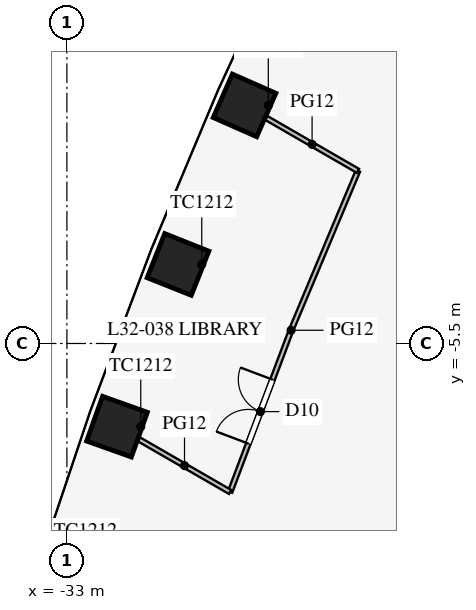
"""IFC4 building model, lengths in metres.
Left out: names, types, materials, properties, quantities, classifications, styles, units other than length and angle.
Written with IfcOpenShell. Run it as: python <this file> out.ifc"""

import sys

from ifc_helpers import new_model, si_unit, direction, frame, frame_2d, origin, origin_2d, place, context, subcontext, project, spatial, rectangle, extrude, element, fill, save


model = new_model("IFC4")
c1 = context("Model", 3, precision=1e-05, world=origin(), true_north=direction((0.0, 1.0)))
c2 = subcontext(c1, "Body", "Model", "MODEL_VIEW")
j1 = project(units=[si_unit("LENGTHUNIT", "METRE"), si_unit("PLANEANGLEUNIT", "RADIAN")], contexts=[c1])
p1 = place(None, origin())
s1 = spatial("IfcSite", under=j1, at=p1, CompositionType="ELEMENT")
p2 = place(p1, origin())
s2 = spatial("IfcBuilding", under=s1, at=p2, CompositionType="ELEMENT")
p3 = place(p2, frame((0.0, 0.0, 140.9)))
s3 = spatial("IfcBuildingStorey", under=s2, at=p3, CompositionType="ELEMENT", Elevation=140.9)
for number, where, z_axis, x_axis in (
    (1, (-28.325, 0.765, 0.0), (0.0, 0.0, 1.0), (-0.403, -0.915, 0.0)),
    (2, (-30.077, -3.42, 0.0), (0.0, 0.0, 1.0), (-0.37, -0.929, 0.0)),
    (3, (-31.682, -7.689, 0.0), (0.0, 0.0, 1.0), (-0.336, -0.942, 0.0)),
):
    element("IfcColumn", number, at=place(p3, frame(where, z_axis=z_axis, x_axis=x_axis)), inside=s3, PredefinedType="COLUMN", context=c2, shape_type="SweptSolid", body=[
        extrude(rectangle(XDim=1.25, YDim=1.25, at=origin_2d()), origin(), (0.0, 0.0, 1.0), 4.2),
    ])
p4 = place(p3, frame((-14.203, -8.2, 0.0), z_axis=(0.0, 0.0, 1.0), x_axis=(-0.866024668836, -0.500001272966, 0.0)))
e4 = element("IfcWall", 4, at=p4, inside=s3, PredefinedType="PARTITIONING", context=c2, shape_type="SweptSolid", body=[
    extrude(rectangle(XDim=16.65, YDim=0.15, at=frame_2d((8.325, 0.0))), origin(), (0.0, 0.0, 1.0), 2.3),
])
p5 = place(p3, frame((-25.342, -0.958, 0.0), z_axis=(0.0, 0.0, 1.0), x_axis=(-0.386807881778, -0.922160323693, 0.0)))
e5 = element("IfcWall", 5, at=p5, inside=s3, PredefinedType="PARTITIONING", context=c2, shape_type="SweptSolid", body=[
    extrude(rectangle(XDim=4.536, YDim=0.12, at=frame_2d((2.268, 0.0))), origin(), (0.0, 0.0, 1.0), 2.9),
])
p6 = place(p3, frame((-27.096, -5.141, 0.0), z_axis=(0.0, 0.0, 1.0), x_axis=(-0.352894560512, -0.93566309597, 0.0)))
e6 = element("IfcWall", 6, at=p6, inside=s3, PredefinedType="PARTITIONING", context=c2, shape_type="SweptSolid", body=[
    extrude(rectangle(XDim=4.561, YDim=0.12, at=frame_2d((2.28, 0.0))), origin(), (0.0, 0.0, 1.0), 2.9),
])
p7 = place(p6, frame((1.4, 0.0, 0.15)))
e7 = element("IfcOpeningElement", 7, at=p7, cuts=e6, PredefinedType="OPENING", context=c2, shape_type="SweptSolid", body=[
    extrude(rectangle(XDim=1.8, YDim=2.1, at=frame_2d((0.9, 1.05))), frame((0.0, 0.07, 0.0), z_axis=(0.0, -1.0, 0.0), x_axis=(1.0, 0.0, 0.0)), (0.0, 0.0, 1.0), 0.14),
])
p8 = place(p3, frame((-25.342, -0.958, 0.0), z_axis=(0.0, 0.0, 1.0), x_axis=(-0.866029478545, 0.499992942241, 0.0)))
e8 = element("IfcWall", 8, at=p8, inside=s3, PredefinedType="PARTITIONING", context=c2, shape_type="SweptSolid", body=[
    extrude(rectangle(XDim=2.787, YDim=0.12, at=frame_2d((1.393, 0.0))), origin(), (0.0, 0.0, 1.0), 2.9),
])
p9 = place(p3, frame((-28.706, -9.408, 0.0), z_axis=(0.0, 0.0, 1.0), x_axis=(-0.866016849815, 0.500014815617, 0.0)))
e9 = element("IfcWall", 9, at=p9, inside=s3, PredefinedType="PARTITIONING", context=c2, shape_type="SweptSolid", body=[
    extrude(rectangle(XDim=2.771, YDim=0.12, at=frame_2d((1.385, 0.0))), origin(), (0.0, 0.0, 1.0), 2.9),
])
p10 = place(p7, frame((1.8, 0.0, 0.0), z_axis=(0.0, 0.0, 1.0), x_axis=(-1.0, 0.0, 0.0)))
e10 = element("IfcDoor", 10, at=p10, inside=s3, OperationType="DOUBLE_DOOR_SINGLE_SWING", PredefinedType="DOOR", context=c2, shape_type="SweptSolid", body=[
    extrude(rectangle(XDim=1.8, YDim=2.1, at=frame_2d((0.9, 1.05))), frame((0.0, 0.025, 0.0), z_axis=(0.0, -1.0, 0.0), x_axis=(1.0, 0.0, 0.0)), (0.0, 0.0, 1.0), 0.05),
])
fill(e7, e10)
save(model, sys.argv[1])
